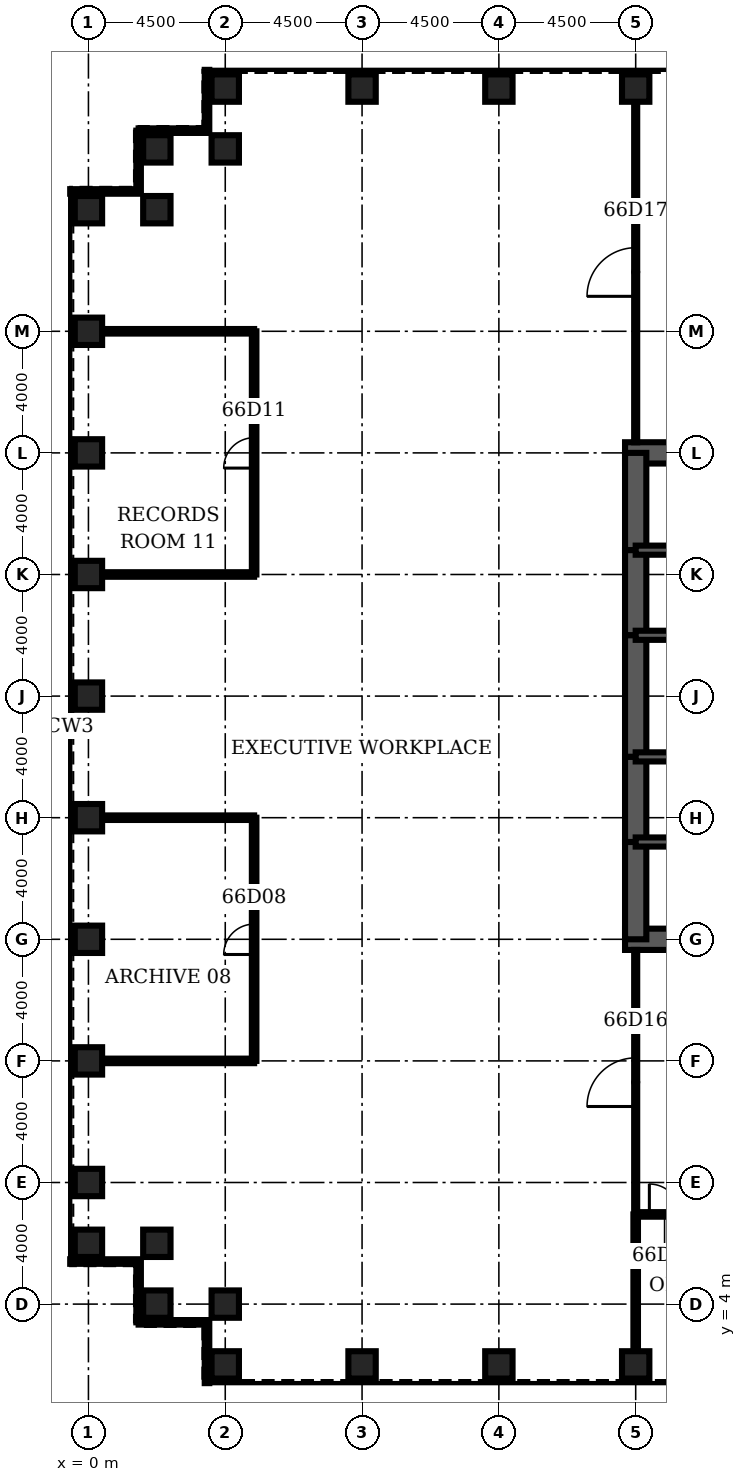
"""IFC4 building model, lengths in metres.
Left out: names, types, materials, properties, quantities, classifications, styles, units other than length and angle.
Written with IfcOpenShell. Run it as: python <this file> out.ifc"""

import sys

from ifc_helpers import new_model, si_unit, direction, frame, frame_2d, origin, origin_2d, place, context, subcontext, project, spatial, rectangle, hollow_rectangle, extrude, element, fill, save


model = new_model("IFC4")
c1 = context("Model", 3, precision=1e-05, world=origin(), true_north=direction((0.0, 1.0)))
c2 = subcontext(c1, "Body", "Model", "MODEL_VIEW")
j1 = project(units=[si_unit("LENGTHUNIT", "METRE"), si_unit("PLANEANGLEUNIT", "RADIAN")], contexts=[c1])
p1 = place(None, origin())
s1 = spatial("IfcSite", under=j1, at=p1, CompositionType="ELEMENT")
p2 = place(p1, origin())
s2 = spatial("IfcBuilding", under=s1, at=p2, CompositionType="ELEMENT")
p3 = place(p2, frame((0.0, 0.0, 292.1)))
s3 = spatial("IfcBuildingStorey", under=s2, at=p3, CompositionType="ELEMENT", Elevation=292.1)
for number, where, z_axis, x_axis in (
    (1, (4.5, 2.0, 0.0), (0.0, 0.0, 1.0), (0.0, 1.0, 0.0)),
    (2, (9.0, 2.0, 0.0), (0.0, 0.0, 1.0), (0.0, 1.0, 0.0)),
    (3, (13.5, 2.0, 0.0), (0.0, 0.0, 1.0), (0.0, 1.0, 0.0)),
    (4, (18.0, 2.0, 0.0), (0.0, 0.0, 1.0), (0.0, 1.0, 0.0)),
    (5, (18.0, 44.0, 0.0), (0.0, 0.0, 1.0), (0.0, 1.0, 0.0)),
    (6, (13.5, 44.0, 0.0), (0.0, 0.0, 1.0), (0.0, 1.0, 0.0)),
    (7, (9.0, 44.0, 0.0), (0.0, 0.0, 1.0), (0.0, 1.0, 0.0)),
    (8, (4.5, 44.0, 0.0), (0.0, 0.0, 1.0), (0.0, 1.0, 0.0)),
    (9, (4.5, 42.0, 0.0), (0.0, 0.0, 1.0), (0.0, 1.0, 0.0)),
    (10, (2.25, 42.0, 0.0), (0.0, 0.0, 1.0), (1.0, 0.0, 0.0)),
    (11, (2.25, 40.0, 0.0), (0.0, 0.0, 1.0), (1.0, 0.0, 0.0)),
    (12, (0.0, 40.0, 0.0), (0.0, 0.0, 1.0), (1.0, 0.0, 0.0)),
    (13, (0.0, 36.0, 0.0), (0.0, 0.0, 1.0), (1.0, 0.0, 0.0)),
    (14, (0.0, 32.0, 0.0), (0.0, 0.0, 1.0), (1.0, 0.0, 0.0)),
    (15, (0.0, 28.0, 0.0), (0.0, 0.0, 1.0), (1.0, 0.0, 0.0)),
    (16, (0.0, 24.0, 0.0), (0.0, 0.0, 1.0), (1.0, 0.0, 0.0)),
    (17, (0.0, 20.0, 0.0), (0.0, 0.0, 1.0), (1.0, 0.0, 0.0)),
    (18, (0.0, 16.0, 0.0), (0.0, 0.0, 1.0), (1.0, 0.0, 0.0)),
    (19, (0.0, 12.0, 0.0), (0.0, 0.0, 1.0), (1.0, 0.0, 0.0)),
    (20, (0.0, 8.0, 0.0), (0.0, 0.0, 1.0), (1.0, 0.0, 0.0)),
    (21, (0.0, 6.0, 0.0), (0.0, 0.0, 1.0), (1.0, 0.0, 0.0)),
    (22, (2.25, 6.0, 0.0), (0.0, 0.0, 1.0), (1.0, 0.0, 0.0)),
    (23, (2.25, 4.0, 0.0), (0.0, 0.0, 1.0), (1.0, 0.0, 0.0)),
    (24, (4.5, 4.0, 0.0), (0.0, 0.0, 1.0), (0.0, 1.0, 0.0)),
):
    element("IfcColumn", number, at=place(p3, frame(where, z_axis=z_axis, x_axis=x_axis)), inside=s3, PredefinedType="COLUMN", context=c2, shape_type="SweptSolid", body=[
        extrude(hollow_rectangle(XDim=0.9, YDim=0.9, WallThickness=0.06, at=origin_2d()), origin(), (0.0, 0.0, 1.0), 4.2),
    ])
for number, where, z_axis, x_axis in (
    (25, (17.65, 16.0, 0.0), (0.0, 0.0, 1.0), (1.0, 0.0, 0.0)),
    (26, (27.0, 32.0, 0.0), (0.0, 0.0, 1.0), (-1.0, 0.0, 0.0)),
):
    element("IfcWall", number, at=place(p3, frame(where, z_axis=z_axis, x_axis=x_axis)), inside=s3, PredefinedType="SHEAR", context=c2, shape_type="SweptSolid", body=[
        extrude(rectangle(XDim=9.35, YDim=0.7, at=frame_2d((4.675, 0.0))), origin(), (0.0, 0.0, 1.0), 4.2),
    ])
p4 = place(p3, frame((18.0, 32.0, 0.0), z_axis=(0.0, 0.0, 1.0), x_axis=(0.0, -1.0, 0.0)))
e27 = element("IfcWall", 27, at=p4, inside=s3, PredefinedType="SHEAR", context=c2, shape_type="SweptSolid", body=[
    extrude(rectangle(XDim=3.2, YDim=0.7, at=frame_2d((1.6, 0.0))), origin(), (0.0, 0.0, 1.0), 4.2),
])
p5 = place(p3, frame((18.0, 28.8, 0.0), z_axis=(0.0, 0.0, 1.0), x_axis=(0.0, -1.0, 0.0)))
e28 = element("IfcWall", 28, at=p5, inside=s3, PredefinedType="SHEAR", context=c2, shape_type="SweptSolid", body=[
    extrude(rectangle(XDim=2.8, YDim=0.7, at=frame_2d((1.4, 0.0))), origin(), (0.0, 0.0, 1.0), 4.2),
])
p6 = place(p5, frame((0.4, 0.0, 0.0)))
e29 = element("IfcOpeningElement", 29, at=p6, cuts=e28, PredefinedType="OPENING", context=c2, shape_type="SweptSolid", body=[
    extrude(rectangle(XDim=1.8, YDim=2.1, at=frame_2d((0.9, 1.05))), frame((0.0, 0.36, 0.0), z_axis=(0.0, -1.0, 0.0), x_axis=(1.0, 0.0, 0.0)), (0.0, 0.0, 1.0), 0.72),
])
p7 = place(p3, frame((18.0, 26.0, 0.0), z_axis=(0.0, 0.0, 1.0), x_axis=(0.0, -1.0, 0.0)))
e30 = element("IfcWall", 30, at=p7, inside=s3, PredefinedType="SHEAR", context=c2, shape_type="SweptSolid", body=[
    extrude(rectangle(XDim=4.0, YDim=0.7, at=frame_2d((2.0, 0.0))), origin(), (0.0, 0.0, 1.0), 4.2),
])
p8 = place(p3, frame((18.0, 22.0, 0.0), z_axis=(0.0, 0.0, 1.0), x_axis=(0.0, -1.0, 0.0)))
e31 = element("IfcWall", 31, at=p8, inside=s3, PredefinedType="SHEAR", context=c2, shape_type="SweptSolid", body=[
    extrude(rectangle(XDim=2.8, YDim=0.7, at=frame_2d((1.4, 0.0))), origin(), (0.0, 0.0, 1.0), 4.2),
])
p9 = place(p8, frame((0.6, 0.0, 0.0)))
e32 = element("IfcOpeningElement", 32, at=p9, cuts=e31, PredefinedType="OPENING", context=c2, shape_type="SweptSolid", body=[
    extrude(rectangle(XDim=1.8, YDim=2.1, at=frame_2d((0.9, 1.05))), frame((0.0, 0.36, 0.0), z_axis=(0.0, -1.0, 0.0), x_axis=(1.0, 0.0, 0.0)), (0.0, 0.0, 1.0), 0.72),
])
p10 = place(p3, frame((18.0, 19.2, 0.0), z_axis=(0.0, 0.0, 1.0), x_axis=(0.0, -1.0, 0.0)))
e33 = element("IfcWall", 33, at=p10, inside=s3, PredefinedType="SHEAR", context=c2, shape_type="SweptSolid", body=[
    extrude(rectangle(XDim=3.2, YDim=0.7, at=frame_2d((1.6, 0.0))), origin(), (0.0, 0.0, 1.0), 4.2),
])
p11 = place(p3, frame((18.0, 19.2, 0.0), z_axis=(0.0, 0.0, 1.0), x_axis=(1.0, 0.0, 0.0)))
e34 = element("IfcWall", 34, at=p11, inside=s3, PredefinedType="SOLIDWALL", context=c2, shape_type="SweptSolid", body=[
    extrude(rectangle(XDim=9.0, YDim=0.3, at=frame_2d((4.5, 0.0))), origin(), (0.0, 0.0, 1.0), 4.2),
])
p12 = place(p11, frame((0.65, 0.0, 0.0)))
e35 = element("IfcOpeningElement", 35, at=p12, cuts=e34, PredefinedType="OPENING", context=c2, shape_type="SweptSolid", body=[
    extrude(rectangle(XDim=1.0, YDim=2.1, at=frame_2d((0.5, 1.05))), frame((0.0, 0.16, 0.0), z_axis=(0.0, -1.0, 0.0), x_axis=(1.0, 0.0, 0.0)), (0.0, 0.0, 1.0), 0.32),
])
p13 = place(p3, frame((18.0, 28.8, 0.0), z_axis=(0.0, 0.0, 1.0), x_axis=(1.0, 0.0, 0.0)))
e36 = element("IfcWall", 36, at=p13, inside=s3, PredefinedType="SOLIDWALL", context=c2, shape_type="SweptSolid", body=[
    extrude(rectangle(XDim=9.0, YDim=0.3, at=frame_2d((4.5, 0.0))), origin(), (0.0, 0.0, 1.0), 4.2),
])
p14 = place(p13, frame((0.65, 0.0, 0.0)))
e37 = element("IfcOpeningElement", 37, at=p14, cuts=e36, PredefinedType="OPENING", context=c2, shape_type="SweptSolid", body=[
    extrude(rectangle(XDim=1.0, YDim=2.1, at=frame_2d((0.5, 1.05))), frame((0.0, 0.16, 0.0), z_axis=(0.0, -1.0, 0.0), x_axis=(1.0, 0.0, 0.0)), (0.0, 0.0, 1.0), 0.32),
])
p15 = place(p3, frame((18.0, 22.0, 0.0), z_axis=(0.0, 0.0, 1.0), x_axis=(1.0, 0.0, 0.0)))
e38 = element("IfcWall", 38, at=p15, inside=s3, PredefinedType="SOLIDWALL", context=c2, shape_type="SweptSolid", body=[
    extrude(rectangle(XDim=6.0, YDim=0.3, at=frame_2d((3.0, 0.0))), origin(), (0.0, 0.0, 1.0), 4.2),
])
p16 = place(p15, frame((2.0, 0.0, 0.0)))
e39 = element("IfcOpeningElement", 39, at=p16, cuts=e38, PredefinedType="OPENING", context=c2, shape_type="SweptSolid", body=[
    extrude(rectangle(XDim=1.0, YDim=2.1, at=frame_2d((0.5, 1.05))), frame((0.0, 0.16, 0.0), z_axis=(0.0, -1.0, 0.0), x_axis=(1.0, 0.0, 0.0)), (0.0, 0.0, 1.0), 0.32),
])
p17 = place(p3, frame((18.0, 26.0, 0.0), z_axis=(0.0, 0.0, 1.0), x_axis=(1.0, 0.0, 0.0)))
e40 = element("IfcWall", 40, at=p17, inside=s3, PredefinedType="SOLIDWALL", context=c2, shape_type="SweptSolid", body=[
    extrude(rectangle(XDim=6.0, YDim=0.3, at=frame_2d((3.0, 0.0))), origin(), (0.0, 0.0, 1.0), 4.2),
])
p18 = place(p3, frame((18.0, 6.95, 0.0), z_axis=(0.0, 0.0, 1.0), x_axis=(1.0, 0.0, 0.0)))
e41 = element("IfcWall", 41, at=p18, inside=s3, PredefinedType="PARTITIONING", context=c2, shape_type="SweptSolid", body=[
    extrude(rectangle(XDim=27.0, YDim=0.15, at=frame_2d((13.5, 0.0))), origin(), (0.0, 0.0, 1.0), 3.0),
])
p19 = place(p18, frame((0.45, 0.0, 0.0)))
e42 = element("IfcOpeningElement", 42, at=p19, cuts=e41, PredefinedType="OPENING", context=c2, shape_type="SweptSolid", body=[
    extrude(rectangle(XDim=1.0, YDim=2.1, at=frame_2d((0.5, 1.05))), frame((0.0, 0.085, 0.0), z_axis=(0.0, -1.0, 0.0), x_axis=(1.0, 0.0, 0.0)), (0.0, 0.0, 1.0), 0.17),
])
p20 = place(p18, frame((4.95, 0.0, 0.0)))
e43 = element("IfcOpeningElement", 43, at=p20, cuts=e41, PredefinedType="OPENING", context=c2, shape_type="SweptSolid", body=[
    extrude(rectangle(XDim=1.0, YDim=2.1, at=frame_2d((0.5, 1.05))), frame((0.0, 0.085, 0.0), z_axis=(0.0, -1.0, 0.0), x_axis=(1.0, 0.0, 0.0)), (0.0, 0.0, 1.0), 0.17),
])
p21 = place(p18, frame((9.45, 0.0, 0.0)))
e44 = element("IfcOpeningElement", 44, at=p21, cuts=e41, PredefinedType="OPENING", context=c2, shape_type="SweptSolid", body=[
    extrude(rectangle(XDim=1.0, YDim=2.1, at=frame_2d((0.5, 1.05))), frame((0.0, 0.085, 0.0), z_axis=(0.0, -1.0, 0.0), x_axis=(1.0, 0.0, 0.0)), (0.0, 0.0, 1.0), 0.17),
])
p22 = place(p18, frame((13.95, 0.0, 0.0)))
e45 = element("IfcOpeningElement", 45, at=p22, cuts=e41, PredefinedType="OPENING", context=c2, shape_type="SweptSolid", body=[
    extrude(rectangle(XDim=1.0, YDim=2.1, at=frame_2d((0.5, 1.05))), frame((0.0, 0.085, 0.0), z_axis=(0.0, -1.0, 0.0), x_axis=(1.0, 0.0, 0.0)), (0.0, 0.0, 1.0), 0.17),
])
p23 = place(p18, frame((18.45, 0.0, 0.0)))
e46 = element("IfcOpeningElement", 46, at=p23, cuts=e41, PredefinedType="OPENING", context=c2, shape_type="SweptSolid", body=[
    extrude(rectangle(XDim=1.0, YDim=2.1, at=frame_2d((0.5, 1.05))), frame((0.0, 0.085, 0.0), z_axis=(0.0, -1.0, 0.0), x_axis=(1.0, 0.0, 0.0)), (0.0, 0.0, 1.0), 0.17),
])
p24 = place(p18, frame((22.95, 0.0, 0.0)))
e47 = element("IfcOpeningElement", 47, at=p24, cuts=e41, PredefinedType="OPENING", context=c2, shape_type="SweptSolid", body=[
    extrude(rectangle(XDim=1.0, YDim=2.1, at=frame_2d((0.5, 1.05))), frame((0.0, 0.085, 0.0), z_axis=(0.0, -1.0, 0.0), x_axis=(1.0, 0.0, 0.0)), (0.0, 0.0, 1.0), 0.17),
])
for number, where, z_axis, x_axis in (
    (48, (0.45, 12.0, 0.0), (0.0, 0.0, 1.0), (1.0, 0.0, 0.0)),
    (49, (0.45, 20.0, 0.0), (0.0, 0.0, 1.0), (1.0, 0.0, 0.0)),
    (50, (0.45, 28.0, 0.0), (0.0, 0.0, 1.0), (1.0, 0.0, 0.0)),
    (51, (0.45, 36.0, 0.0), (0.0, 0.0, 1.0), (1.0, 0.0, 0.0)),
):
    element("IfcWall", number, at=place(p3, frame(where, z_axis=z_axis, x_axis=x_axis)), inside=s3, PredefinedType="PARTITIONING", context=c2, shape_type="SweptSolid", body=[
        extrude(rectangle(XDim=5.0, YDim=0.15, at=frame_2d((2.5, 0.0))), origin(), (0.0, 0.0, 1.0), 3.0),
    ])
p25 = place(p3, frame((5.45, 12.0, 0.0), z_axis=(0.0, 0.0, 1.0), x_axis=(0.0, 1.0, 0.0)))
e52 = element("IfcWall", 52, at=p25, inside=s3, PredefinedType="PARTITIONING", context=c2, shape_type="SweptSolid", body=[
    extrude(rectangle(XDim=8.0, YDim=0.15, at=frame_2d((4.0, 0.0))), origin(), (0.0, 0.0, 1.0), 3.0),
])
p26 = place(p25, frame((3.5, 0.0, 0.0)))
e53 = element("IfcOpeningElement", 53, at=p26, cuts=e52, PredefinedType="OPENING", context=c2, shape_type="SweptSolid", body=[
    extrude(rectangle(XDim=1.0, YDim=2.1, at=frame_2d((0.5, 1.05))), frame((0.0, 0.085, 0.0), z_axis=(0.0, -1.0, 0.0), x_axis=(1.0, 0.0, 0.0)), (0.0, 0.0, 1.0), 0.17),
])
p27 = place(p3, frame((5.45, 28.0, 0.0), z_axis=(0.0, 0.0, 1.0), x_axis=(0.0, 1.0, 0.0)))
e54 = element("IfcWall", 54, at=p27, inside=s3, PredefinedType="PARTITIONING", context=c2, shape_type="SweptSolid", body=[
    extrude(rectangle(XDim=8.0, YDim=0.15, at=frame_2d((4.0, 0.0))), origin(), (0.0, 0.0, 1.0), 3.0),
])
p28 = place(p27, frame((3.5, 0.0, 0.0)))
e55 = element("IfcOpeningElement", 55, at=p28, cuts=e54, PredefinedType="OPENING", context=c2, shape_type="SweptSolid", body=[
    extrude(rectangle(XDim=1.0, YDim=2.1, at=frame_2d((0.5, 1.05))), frame((0.0, 0.085, 0.0), z_axis=(0.0, -1.0, 0.0), x_axis=(1.0, 0.0, 0.0)), (0.0, 0.0, 1.0), 0.17),
])
p29 = place(p3, frame((18.0, 2.45, 0.0), z_axis=(0.0, 0.0, 1.0), x_axis=(0.0, 1.0, 0.0)))
e56 = element("IfcWall", 56, at=p29, inside=s3, PredefinedType="PARTITIONING", context=c2, shape_type="SweptSolid", body=[
    extrude(rectangle(XDim=4.5, YDim=0.15, at=frame_2d((2.25, 0.0))), origin(), (0.0, 0.0, 1.0), 3.0),
])
p30 = place(p3, frame((18.0, 6.95, 0.0), z_axis=(0.0, 0.0, 1.0), x_axis=(0.0, 1.0, 0.0)))
e57 = element("IfcWall", 57, at=p30, inside=s3, PredefinedType="PARTITIONING", context=c2, shape_type="SweptSolid", body=[
    extrude(rectangle(XDim=8.7, YDim=0.1, at=frame_2d((4.35, 0.0))), origin(), (0.0, 0.0, 1.0), 3.0),
])
p31 = place(p30, frame((3.55, 0.0, 0.0)))
e58 = element("IfcOpeningElement", 58, at=p31, cuts=e57, PredefinedType="OPENING", context=c2, shape_type="SweptSolid", body=[
    extrude(rectangle(XDim=1.6, YDim=2.1, at=frame_2d((0.8, 1.05))), frame((0.0, 0.06, 0.0), z_axis=(0.0, -1.0, 0.0), x_axis=(1.0, 0.0, 0.0)), (0.0, 0.0, 1.0), 0.12),
])
p32 = place(p3, frame((18.0, 32.35, 0.0), z_axis=(0.0, 0.0, 1.0), x_axis=(0.0, 1.0, 0.0)))
e59 = element("IfcWall", 59, at=p32, inside=s3, PredefinedType="PARTITIONING", context=c2, shape_type="SweptSolid", body=[
    extrude(rectangle(XDim=11.2, YDim=0.1, at=frame_2d((5.6, 0.0))), origin(), (0.0, 0.0, 1.0), 3.0),
])
p33 = place(p32, frame((4.8, 0.0, 0.0)))
e60 = element("IfcOpeningElement", 60, at=p33, cuts=e59, PredefinedType="OPENING", context=c2, shape_type="SweptSolid", body=[
    extrude(rectangle(XDim=1.6, YDim=2.1, at=frame_2d((0.8, 1.05))), frame((0.0, 0.06, 0.0), z_axis=(0.0, -1.0, 0.0), x_axis=(1.0, 0.0, 0.0)), (0.0, 0.0, 1.0), 0.12),
])
p34 = place(p3, frame((3.9, 44.6, 0.0), z_axis=(0.0, 0.0, 1.0), x_axis=(0.0, -1.0, 0.0)))
e61 = element("IfcWall", 61, at=p34, inside=s3, PredefinedType="ELEMENTEDWALL", context=c2, shape_type="SweptSolid", body=[
    extrude(rectangle(XDim=2.0, YDim=0.15, at=frame_2d((1.0, 0.0))), origin(), (0.0, 0.0, 1.0), 4.04),
])
p35 = place(p3, frame((3.9, 42.6, 0.0), z_axis=(0.0, 0.0, 1.0), x_axis=(-1.0, 0.0, 0.0)))
e62 = element("IfcWall", 62, at=p35, inside=s3, PredefinedType="ELEMENTEDWALL", context=c2, shape_type="SweptSolid", body=[
    extrude(rectangle(XDim=2.25, YDim=0.15, at=frame_2d((1.125, 0.0))), origin(), (0.0, 0.0, 1.0), 4.04),
])
p36 = place(p3, frame((1.65, 42.6, 0.0), z_axis=(0.0, 0.0, 1.0), x_axis=(0.0, -1.0, 0.0)))
e63 = element("IfcWall", 63, at=p36, inside=s3, PredefinedType="ELEMENTEDWALL", context=c2, shape_type="SweptSolid", body=[
    extrude(rectangle(XDim=2.0, YDim=0.15, at=frame_2d((1.0, 0.0))), origin(), (0.0, 0.0, 1.0), 4.04),
])
for number, where, z_axis, x_axis in (
    (64, (1.65, 40.6, 0.0), (0.0, 0.0, 1.0), (-1.0, 0.0, 0.0)),
    (65, (-0.6, 5.4, 0.0), (0.0, 0.0, 1.0), (1.0, 0.0, 0.0)),
):
    element("IfcWall", number, at=place(p3, frame(where, z_axis=z_axis, x_axis=x_axis)), inside=s3, PredefinedType="ELEMENTEDWALL", context=c2, shape_type="SweptSolid", body=[
        extrude(rectangle(XDim=2.25, YDim=0.15, at=frame_2d((1.125, 0.0))), origin(), (0.0, 0.0, 1.0), 4.04),
    ])
p37 = place(p3, frame((1.65, 5.4, 0.0), z_axis=(0.0, 0.0, 1.0), x_axis=(0.0, -1.0, 0.0)))
e66 = element("IfcWall", 66, at=p37, inside=s3, PredefinedType="ELEMENTEDWALL", context=c2, shape_type="SweptSolid", body=[
    extrude(rectangle(XDim=2.0, YDim=0.15, at=frame_2d((1.0, 0.0))), origin(), (0.0, 0.0, 1.0), 4.04),
])
p38 = place(p3, frame((1.65, 3.4, 0.0), z_axis=(0.0, 0.0, 1.0), x_axis=(1.0, 0.0, 0.0)))
e67 = element("IfcWall", 67, at=p38, inside=s3, PredefinedType="ELEMENTEDWALL", context=c2, shape_type="SweptSolid", body=[
    extrude(rectangle(XDim=2.25, YDim=0.15, at=frame_2d((1.125, 0.0))), origin(), (0.0, 0.0, 1.0), 4.04),
])
p39 = place(p3, frame((3.9, 3.4, 0.0), z_axis=(0.0, 0.0, 1.0), x_axis=(0.0, -1.0, 0.0)))
e68 = element("IfcWall", 68, at=p39, inside=s3, PredefinedType="ELEMENTEDWALL", context=c2, shape_type="SweptSolid", body=[
    extrude(rectangle(XDim=2.0, YDim=0.15, at=frame_2d((1.0, 0.0))), origin(), (0.0, 0.0, 1.0), 4.04),
])
p40 = place(p19, origin())
e69 = element("IfcDoor", 69, at=p40, inside=s3, OperationType="SINGLE_SWING_LEFT", PredefinedType="DOOR", context=c2, shape_type="SweptSolid", body=[
    extrude(rectangle(XDim=1.0, YDim=2.1, at=frame_2d((0.5, 1.05))), frame((0.0, 0.025, 0.0), z_axis=(0.0, -1.0, 0.0), x_axis=(1.0, 0.0, 0.0)), (0.0, 0.0, 1.0), 0.05),
])
fill(e42, e69)
p41 = place(p26, origin())
e70 = element("IfcDoor", 70, at=p41, inside=s3, OperationType="SINGLE_SWING_LEFT", PredefinedType="DOOR", context=c2, shape_type="SweptSolid", body=[
    extrude(rectangle(XDim=1.0, YDim=2.1, at=frame_2d((0.5, 1.05))), frame((0.0, 0.025, 0.0), z_axis=(0.0, -1.0, 0.0), x_axis=(1.0, 0.0, 0.0)), (0.0, 0.0, 1.0), 0.05),
])
fill(e53, e70)
p42 = place(p28, origin())
e71 = element("IfcDoor", 71, at=p42, inside=s3, OperationType="SINGLE_SWING_LEFT", PredefinedType="DOOR", context=c2, shape_type="SweptSolid", body=[
    extrude(rectangle(XDim=1.0, YDim=2.1, at=frame_2d((0.5, 1.05))), frame((0.0, 0.025, 0.0), z_axis=(0.0, -1.0, 0.0), x_axis=(1.0, 0.0, 0.0)), (0.0, 0.0, 1.0), 0.05),
])
fill(e55, e71)
p43 = place(p31, origin())
e72 = element("IfcDoor", 72, at=p43, inside=s3, OperationType="SINGLE_SWING_LEFT", PredefinedType="DOOR", context=c2, shape_type="SweptSolid", body=[
    extrude(rectangle(XDim=1.6, YDim=2.1, at=frame_2d((0.8, 1.05))), frame((0.0, 0.025, 0.0), z_axis=(0.0, -1.0, 0.0), x_axis=(1.0, 0.0, 0.0)), (0.0, 0.0, 1.0), 0.05),
])
fill(e58, e72)
p44 = place(p33, origin())
e73 = element("IfcDoor", 73, at=p44, inside=s3, OperationType="SINGLE_SWING_LEFT", PredefinedType="DOOR", context=c2, shape_type="SweptSolid", body=[
    extrude(rectangle(XDim=1.6, YDim=2.1, at=frame_2d((0.8, 1.05))), frame((0.0, 0.025, 0.0), z_axis=(0.0, -1.0, 0.0), x_axis=(1.0, 0.0, 0.0)), (0.0, 0.0, 1.0), 0.05),
])
fill(e60, e73)
p45 = place(p12, origin())
e74 = element("IfcDoor", 74, at=p45, inside=s3, OperationType="SINGLE_SWING_LEFT", PredefinedType="DOOR", context=c2, shape_type="SweptSolid", body=[
    extrude(rectangle(XDim=1.0, YDim=2.1, at=frame_2d((0.5, 1.05))), frame((0.0, 0.025, 0.0), z_axis=(0.0, -1.0, 0.0), x_axis=(1.0, 0.0, 0.0)), (0.0, 0.0, 1.0), 0.05),
])
fill(e35, e74)
p46 = place(p14, origin())
e75 = element("IfcDoor", 75, at=p46, inside=s3, OperationType="SINGLE_SWING_LEFT", PredefinedType="DOOR", context=c2, shape_type="SweptSolid", body=[
    extrude(rectangle(XDim=1.0, YDim=2.1, at=frame_2d((0.5, 1.05))), frame((0.0, 0.025, 0.0), z_axis=(0.0, -1.0, 0.0), x_axis=(1.0, 0.0, 0.0)), (0.0, 0.0, 1.0), 0.05),
])
fill(e37, e75)
p47 = place(p9, origin())
e76 = element("IfcDoor", 76, at=p47, inside=s3, OperationType="SINGLE_SWING_LEFT", PredefinedType="DOOR", context=c2, shape_type="SweptSolid", body=[
    extrude(rectangle(XDim=1.8, YDim=2.1, at=frame_2d((0.9, 1.05))), frame((0.0, 0.35, 0.0), z_axis=(0.0, -1.0, 0.0), x_axis=(1.0, 0.0, 0.0)), (0.0, 0.0, 1.0), 0.699),
])
fill(e32, e76)
p48 = place(p6, origin())
e77 = element("IfcDoor", 77, at=p48, inside=s3, OperationType="SINGLE_SWING_LEFT", PredefinedType="DOOR", context=c2, shape_type="SweptSolid", body=[
    extrude(rectangle(XDim=1.8, YDim=2.1, at=frame_2d((0.9, 1.05))), frame((0.0, 0.35, 0.0), z_axis=(0.0, -1.0, 0.0), x_axis=(1.0, 0.0, 0.0)), (0.0, 0.0, 1.0), 0.699),
])
fill(e29, e77)
save(model, sys.argv[1])
